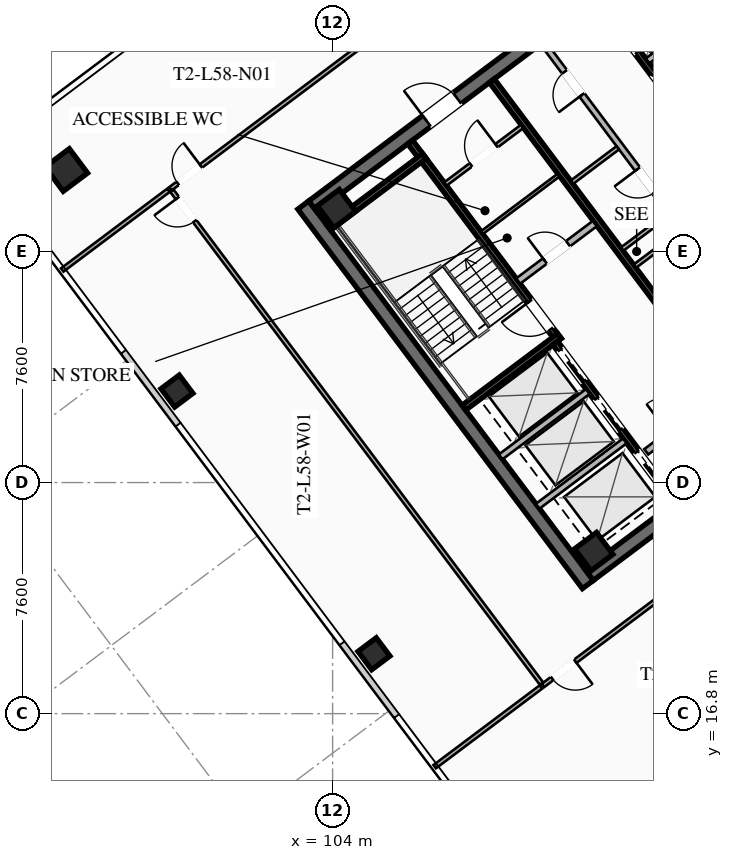
"""IFC4 building model, lengths in metres.
Left out: names, types, materials, properties, quantities, classifications, styles, units other than length and angle.
Written with IfcOpenShell. Run it as: python <this file> out.ifc"""

import sys

from ifc_helpers import new_model, si_unit, direction, frame, frame_2d, origin, origin_2d, place, context, subcontext, project, spatial, rectangle, hollow_rectangle, extrude, element, fill, save


model = new_model("IFC4")
c1 = context("Model", 3, precision=1e-05, world=origin(), true_north=direction((0.0, 1.0)))
c2 = subcontext(c1, "Body", "Model", "MODEL_VIEW")
j1 = project(units=[si_unit("LENGTHUNIT", "METRE"), si_unit("PLANEANGLEUNIT", "RADIAN")], contexts=[c1])
p1 = place(None, origin())
s1 = spatial("IfcSite", under=j1, at=p1, CompositionType="ELEMENT")
p2 = place(p1, origin())
s2 = spatial("IfcBuilding", under=s1, at=p2, CompositionType="ELEMENT")
p3 = place(p2, frame((0.0, 0.0, 214.85)))
s3 = spatial("IfcBuildingStorey", under=s2, at=p3, CompositionType="ELEMENT", Elevation=214.85)
p4 = place(p3, frame((112.396, 21.047, 0.0), z_axis=(0.0, 0.0, 1.0), x_axis=(-0.600005007985, 0.799996243986, 0.0)))
e1 = element("IfcWall", 1, at=p4, inside=s3, PredefinedType="SHEAR", context=c2, shape_type="SweptSolid", body=[
    extrude(rectangle(XDim=15.6, YDim=0.45, at=frame_2d((7.8, 0.0))), origin(), (0.0, 0.0, 1.0), 3.55),
])
p5 = place(p3, frame((124.649, 30.518, 0.0), z_axis=(0.0, 0.0, 1.0), x_axis=(-0.8, -0.6, 0.0)))
e2 = element("IfcWall", 2, at=p5, inside=s3, PredefinedType="SHEAR", context=c2, shape_type="SweptSolid", body=[
    extrude(rectangle(XDim=15.26, YDim=0.45, at=frame_2d((7.63, 0.0))), origin(), (0.0, 0.0, 1.0), 3.55),
])
p6 = place(p5, frame((9.33, 0.0, 0.0)))
e3 = element("IfcOpeningElement", 3, at=p6, cuts=e2, PredefinedType="OPENING", context=c2, shape_type="SweptSolid", body=[
    extrude(rectangle(XDim=1.25, YDim=2.25, at=frame_2d((0.625, 1.125))), frame((0.0, 0.235, 0.0), z_axis=(0.0, -1.0, 0.0), x_axis=(1.0, 0.0, 0.0)), (0.0, 0.0, 1.0), 0.47),
])
p7 = place(p5, frame((4.28, 0.0, 0.0)))
e4 = element("IfcOpeningElement", 4, at=p7, cuts=e2, PredefinedType="OPENING", context=c2, shape_type="SweptSolid", body=[
    extrude(rectangle(XDim=1.25, YDim=2.25, at=frame_2d((0.625, 1.125))), frame((0.0, 0.235, 0.0), z_axis=(0.0, -1.0, 0.0), x_axis=(1.0, 0.0, 0.0)), (0.0, 0.0, 1.0), 0.47),
])
p8 = place(p3, frame((103.351, 33.482, 0.0), z_axis=(0.0, 0.0, 1.0), x_axis=(0.8, 0.6, 0.0)))
e5 = element("IfcWall", 5, at=p8, inside=s3, PredefinedType="SHEAR", context=c2, shape_type="SweptSolid", body=[
    extrude(rectangle(XDim=15.26, YDim=0.45, at=frame_2d((7.63, 0.0))), origin(), (0.0, 0.0, 1.0), 3.55),
])
p9 = place(p8, frame((4.68, 0.0, 0.0)))
e6 = element("IfcOpeningElement", 6, at=p9, cuts=e5, PredefinedType="OPENING", context=c2, shape_type="SweptSolid", body=[
    extrude(rectangle(XDim=1.25, YDim=2.25, at=frame_2d((0.625, 1.125))), frame((0.0, 0.235, 0.0), z_axis=(0.0, -1.0, 0.0), x_axis=(1.0, 0.0, 0.0)), (0.0, 0.0, 1.0), 0.47),
])
p10 = place(p8, frame((9.73, 0.0, 0.0)))
e7 = element("IfcOpeningElement", 7, at=p10, cuts=e5, PredefinedType="OPENING", context=c2, shape_type="SweptSolid", body=[
    extrude(rectangle(XDim=1.25, YDim=2.25, at=frame_2d((0.625, 1.125))), frame((0.0, 0.235, 0.0), z_axis=(0.0, -1.0, 0.0), x_axis=(1.0, 0.0, 0.0)), (0.0, 0.0, 1.0), 0.47),
])
for number, where, z_axis, x_axis in (
    (8, (112.59, 22.13, 0.0), (0.0, 0.0, 1.0), (0.8, 0.6, 0.0)),
    (9, (104.13, 33.41, 0.0), (0.0, 0.0, 1.0), (0.8, 0.6, 0.0)),
):
    element("IfcColumn", number, at=place(p3, frame(where, z_axis=z_axis, x_axis=x_axis)), inside=s3, PredefinedType="COLUMN", context=c2, shape_type="SweptSolid", body=[
        extrude(hollow_rectangle(XDim=0.9, YDim=0.9, WallThickness=0.04, at=origin_2d()), origin(), (0.0, 0.0, 1.0), 3.37),
    ])
p11 = place(p3, frame((95.24, 34.68, 0.0), z_axis=(0.0, 0.0, 1.0), x_axis=(0.799999996291, 0.600000004945, 0.0)))
e10 = element("IfcColumn", 10, at=p11, inside=s3, PredefinedType="COLUMN", context=c2, shape_type="SweptSolid", body=[
    extrude(hollow_rectangle(XDim=1.0, YDim=1.0, WallThickness=0.04, at=origin_2d()), origin(), (0.0, 0.0, 1.0), 3.37),
])
for number, where, z_axis, x_axis in (
    (11, (98.88, 27.41, 0.0), (0.0, 0.0, 1.0), (0.8, 0.6, 0.0)),
    (12, (105.36, 18.77, 0.0), (0.0, 0.0, 1.0), (0.8, 0.6, 0.0)),
):
    element("IfcColumn", number, at=place(p3, frame(where, z_axis=z_axis, x_axis=x_axis)), inside=s3, PredefinedType="COLUMN", context=c2, shape_type="SweptSolid", body=[
        extrude(hollow_rectangle(XDim=0.75, YDim=0.75, WallThickness=0.032, at=origin_2d()), origin(), (0.0, 0.0, 1.0), 3.37),
    ])
p12 = place(p3, frame((111.44, 29.08, 0.0), z_axis=(0.0, 0.0, 1.0), x_axis=(-0.59999041401, 0.800007189403, 0.0)))
e13 = element("IfcWall", 13, at=p12, inside=s3, PredefinedType="SHEAR", context=c2, shape_type="SweptSolid", body=[
    extrude(rectangle(XDim=8.15, YDim=0.2, at=frame_2d((4.075, 0.0))), origin(), (0.0, 0.0, 1.0), 3.37),
])
p13 = place(p12, frame((0.45, 0.0, 0.0)))
e14 = element("IfcOpeningElement", 14, at=p13, cuts=e13, PredefinedType="OPENING", context=c2, shape_type="SweptSolid", body=[
    extrude(rectangle(XDim=1.15, YDim=2.2, at=frame_2d((0.575, 1.1))), frame((0.0, 0.11, 0.0), z_axis=(0.0, -1.0, 0.0), x_axis=(1.0, 0.0, 0.0)), (0.0, 0.0, 1.0), 0.22),
])
for number, where, z_axis, x_axis in (
    (15, (108.316, 26.862, 0.0), (0.0, 0.0, 1.0), (0.8, 0.6, 0.0)),
    (16, (103.876, 32.782, 0.0), (0.0, 0.0, 1.0), (0.8, 0.6, 0.0)),
):
    element("IfcWall", number, at=place(p3, frame(where, z_axis=z_axis, x_axis=x_axis)), inside=s3, PredefinedType="SHEAR", context=c2, shape_type="SweptSolid", body=[
        extrude(rectangle(XDim=3.93, YDim=0.2, at=frame_2d((1.965, 0.0))), origin(), (0.0, 0.0, 1.0), 3.37),
    ])
p14 = place(p3, frame((118.058, 25.856, 0.0), z_axis=(0.0, 0.0, 1.0), x_axis=(-0.600002657301, 0.799998007018, 0.0)))
e17 = element("IfcWall", 17, at=p14, inside=s3, PredefinedType="SHEAR", context=c2, shape_type="SweptSolid", body=[
    extrude(rectangle(XDim=14.7, YDim=0.2, at=frame_2d((7.35, 0.0))), origin(), (0.0, 0.0, 1.0), 3.37),
])
p15 = place(p3, frame((110.104, 31.028, 0.0), z_axis=(0.0, 0.0, 1.0), x_axis=(0.800018601094, 0.59997519774, 0.0)))
e18 = element("IfcWall", 18, at=p15, inside=s3, PredefinedType="SOLIDWALL", context=c2, shape_type="SweptSolid", body=[
    extrude(rectangle(XDim=3.15, YDim=0.22, at=frame_2d((1.575, 0.0))), origin(), (0.0, 0.0, 1.0), 2.723),
])
p16 = place(p15, frame((1.1, 0.0, 0.0)))
e19 = element("IfcOpeningElement", 19, at=p16, cuts=e18, PredefinedType="OPENING", context=c2, shape_type="SweptSolid", body=[
    extrude(rectangle(XDim=0.95, YDim=2.05, at=frame_2d((0.475, 1.025))), frame((0.0, 0.12, 0.0), z_axis=(0.0, -1.0, 0.0), x_axis=(1.0, 0.0, 0.0)), (0.0, 0.0, 1.0), 0.24),
])
p17 = place(p3, frame((114.316, 25.412, 0.0), z_axis=(0.0, 0.0, 1.0), x_axis=(0.800018601094, 0.59997519774, 0.0)))
e20 = element("IfcWall", 20, at=p17, inside=s3, PredefinedType="SOLIDWALL", context=c2, shape_type="SweptSolid", body=[
    extrude(rectangle(XDim=3.15, YDim=0.22, at=frame_2d((1.575, 0.0))), origin(), (0.0, 0.0, 1.0), 2.723),
])
p18 = place(p17, frame((0.95, 0.0, 0.0)))
e21 = element("IfcOpeningElement", 21, at=p18, cuts=e20, PredefinedType="OPENING", context=c2, shape_type="SweptSolid", body=[
    extrude(rectangle(XDim=1.25, YDim=2.25, at=frame_2d((0.625, 1.125))), frame((0.0, 0.12, 0.0), z_axis=(0.0, -1.0, 0.0), x_axis=(1.0, 0.0, 0.0)), (0.0, 0.0, 1.0), 0.24),
])
p19 = place(p3, frame((115.25, 23.75, 0.0), z_axis=(0.0, 0.0, 1.0), x_axis=(-0.599994036198, 0.800004472816, 0.0)))
e22 = element("IfcWall", 22, at=p19, inside=s3, PredefinedType="SHEAR", context=c2, shape_type="SweptSolid", body=[
    extrude(rectangle(XDim=6.55, YDim=0.2, at=frame_2d((3.275, 0.0))), origin(), (0.0, 0.0, 1.0), 3.37),
])
p20 = place(p19, frame((4.975, 0.0, 0.0)))
e23 = element("IfcOpeningElement", 23, at=p20, cuts=e22, PredefinedType="OPENING", context=c2, shape_type="SweptSolid", body=[
    extrude(rectangle(XDim=1.3, YDim=2.25, at=frame_2d((0.65, 1.125))), frame((0.0, 0.11, 0.0), z_axis=(0.0, -1.0, 0.0), x_axis=(1.0, 0.0, 0.0)), (0.0, 0.0, 1.0), 0.22),
])
p21 = place(p19, frame((2.975, 0.0, 0.0)))
e24 = element("IfcOpeningElement", 24, at=p21, cuts=e22, PredefinedType="OPENING", context=c2, shape_type="SweptSolid", body=[
    extrude(rectangle(XDim=1.3, YDim=2.25, at=frame_2d((0.65, 1.125))), frame((0.0, 0.11, 0.0), z_axis=(0.0, -1.0, 0.0), x_axis=(1.0, 0.0, 0.0)), (0.0, 0.0, 1.0), 0.22),
])
p22 = place(p19, frame((0.775, 0.0, 0.0)))
e25 = element("IfcOpeningElement", 25, at=p22, cuts=e22, PredefinedType="OPENING", context=c2, shape_type="SweptSolid", body=[
    extrude(rectangle(XDim=1.3, YDim=2.25, at=frame_2d((0.65, 1.125))), frame((0.0, 0.11, 0.0), z_axis=(0.0, -1.0, 0.0), x_axis=(1.0, 0.0, 0.0)), (0.0, 0.0, 1.0), 0.22),
])
for number, where, z_axis, x_axis in (
    (26, (110.746, 23.622, 0.0), (0.0, 0.0, 1.0), (0.8, 0.6, 0.0)),
    (27, (109.528, 25.246, 0.0), (0.0, 0.0, 1.0), (0.8, 0.6, 0.0)),
):
    element("IfcWall", number, at=place(p3, frame(where, z_axis=z_axis, x_axis=x_axis)), inside=s3, PredefinedType="SOLIDWALL", context=c2, shape_type="SweptSolid", body=[
        extrude(rectangle(XDim=3.58, YDim=0.2, at=frame_2d((1.79, 0.0))), origin(), (0.0, 0.0, 1.0), 3.37),
    ])
p23 = place(p3, frame((112.75, 40.25, 0.0), z_axis=(0.0, 0.0, 1.0), x_axis=(0.599994036198, -0.800004472816, 0.0)))
e28 = element("IfcWall", 28, at=p23, inside=s3, PredefinedType="SHEAR", context=c2, shape_type="SweptSolid", body=[
    extrude(rectangle(XDim=6.55, YDim=0.2, at=frame_2d((3.275, 0.0))), origin(), (0.0, 0.0, 1.0), 3.37),
])
p24 = place(p23, frame((5.075, 0.0, 0.0)))
e29 = element("IfcOpeningElement", 29, at=p24, cuts=e28, PredefinedType="OPENING", context=c2, shape_type="SweptSolid", body=[
    extrude(rectangle(XDim=1.1, YDim=2.2, at=frame_2d((0.55, 1.1))), frame((0.0, 0.11, 0.0), z_axis=(0.0, -1.0, 0.0), x_axis=(1.0, 0.0, 0.0)), (0.0, 0.0, 1.0), 0.22),
])
p25 = place(p23, frame((3.025, 0.0, 0.0)))
e30 = element("IfcOpeningElement", 30, at=p25, cuts=e28, PredefinedType="OPENING", context=c2, shape_type="SweptSolid", body=[
    extrude(rectangle(XDim=1.1, YDim=2.2, at=frame_2d((0.55, 1.1))), frame((0.0, 0.11, 0.0), z_axis=(0.0, -1.0, 0.0), x_axis=(1.0, 0.0, 0.0)), (0.0, 0.0, 1.0), 0.22),
])
p26 = place(p23, frame((1.025, 0.0, 0.0)))
e31 = element("IfcOpeningElement", 31, at=p26, cuts=e28, PredefinedType="OPENING", context=c2, shape_type="SweptSolid", body=[
    extrude(rectangle(XDim=1.1, YDim=2.2, at=frame_2d((0.55, 1.1))), frame((0.0, 0.11, 0.0), z_axis=(0.0, -1.0, 0.0), x_axis=(1.0, 0.0, 0.0)), (0.0, 0.0, 1.0), 0.22),
])
p27 = place(p3, frame((114.36, 38.27, 0.0), z_axis=(0.0, 0.0, 1.0), x_axis=(0.800008183455, 0.599989088572, 0.0)))
e32 = element("IfcWall", 32, at=p27, inside=s3, PredefinedType="SOLIDWALL", context=c2, shape_type="SweptSolid", body=[
    extrude(rectangle(XDim=3.58, YDim=0.2, at=frame_2d((1.79, 0.0))), origin(), (0.0, 0.0, 1.0), 3.37),
])
p28 = place(p3, frame((107.71, 34.22, 0.0), z_axis=(0.0, 0.0, 1.0), x_axis=(0.799981399002, 0.60002480053, 0.0)))
e33 = element("IfcWall", 33, at=p28, inside=s3, PredefinedType="PARTITIONING", context=c2, shape_type="SweptSolid", body=[
    extrude(rectangle(XDim=3.15, YDim=0.135, at=frame_2d((1.575, 0.0))), origin(), (0.0, 0.0, 1.0), 2.723),
])
p29 = place(p28, frame((1.05, 0.0, 0.0)))
e34 = element("IfcOpeningElement", 34, at=p29, cuts=e33, PredefinedType="OPENING", context=c2, shape_type="SweptSolid", body=[
    extrude(rectangle(XDim=1.05, YDim=2.2, at=frame_2d((0.525, 1.1))), frame((0.0, 0.077, 0.0), z_axis=(0.0, -1.0, 0.0), x_axis=(1.0, 0.0, 0.0)), (0.0, 0.0, 1.0), 0.155),
])
p30 = place(p3, frame((108.91, 32.62, 0.0), z_axis=(0.0, 0.0, 1.0), x_axis=(0.800018601094, 0.59997519774, 0.0)))
e35 = element("IfcWall", 35, at=p30, inside=s3, PredefinedType="PARTITIONING", context=c2, shape_type="SweptSolid", body=[
    extrude(rectangle(XDim=3.15, YDim=0.11, at=frame_2d((1.575, 0.0))), origin(), (0.0, 0.0, 1.0), 2.723),
])
p31 = place(p3, frame((113.946, 31.522, 0.0), z_axis=(0.0, 0.0, 1.0), x_axis=(0.8, 0.6, 0.0)))
e36 = element("IfcWall", 36, at=p31, inside=s3, PredefinedType="PARTITIONING", context=c2, shape_type="SweptSolid", body=[
    extrude(rectangle(XDim=1.88, YDim=0.135, at=frame_2d((0.94, 0.0))), origin(), (0.0, 0.0, 1.0), 2.723),
])
p32 = place(p3, frame((115.11, 33.27, 0.0), z_axis=(0.0, 0.0, 1.0), x_axis=(-0.600011160345, 0.79999162962, 0.0)))
e37 = element("IfcWall", 37, at=p32, inside=s3, PredefinedType="SOLIDWALL", context=c2, shape_type="SweptSolid", body=[
    extrude(rectangle(XDim=7.0, YDim=0.2, at=frame_2d((3.5, 0.0))), origin(), (0.0, 0.0, 1.0), 2.723),
])
p33 = place(p32, frame((0.85, 0.0, 0.0)))
e38 = element("IfcOpeningElement", 38, at=p33, cuts=e37, PredefinedType="OPENING", context=c2, shape_type="SweptSolid", body=[
    extrude(rectangle(XDim=0.95, YDim=2.05, at=frame_2d((0.475, 1.025))), frame((0.0, 0.11, 0.0), z_axis=(0.0, -1.0, 0.0), x_axis=(1.0, 0.0, 0.0)), (0.0, 0.0, 1.0), 0.22),
])
p34 = place(p32, frame((4.85, 0.0, 0.0)))
e39 = element("IfcOpeningElement", 39, at=p34, cuts=e37, PredefinedType="OPENING", context=c2, shape_type="SweptSolid", body=[
    extrude(rectangle(XDim=0.95, YDim=2.05, at=frame_2d((0.475, 1.025))), frame((0.0, 0.11, 0.0), z_axis=(0.0, -1.0, 0.0), x_axis=(1.0, 0.0, 0.0)), (0.0, 0.0, 1.0), 0.22),
])
p35 = place(p3, frame((113.526, 32.082, 0.0), z_axis=(0.0, 0.0, 1.0), x_axis=(0.800046745961, 0.599937666993, 0.0)))
e40 = element("IfcWall", 40, at=p35, inside=s3, PredefinedType="PARTITIONING", context=c2, shape_type="SweptSolid", body=[
    extrude(rectangle(XDim=1.88, YDim=0.135, at=frame_2d((0.94, 0.0))), origin(), (0.0, 0.0, 1.0), 2.723),
])
p36 = place(p3, frame((111.876, 34.282, 0.0), z_axis=(0.0, 0.0, 1.0), x_axis=(0.8, 0.6, 0.0)))
e41 = element("IfcWall", 41, at=p36, inside=s3, PredefinedType="PARTITIONING", context=c2, shape_type="SweptSolid", body=[
    extrude(rectangle(XDim=1.88, YDim=0.135, at=frame_2d((0.94, 0.0))), origin(), (0.0, 0.0, 1.0), 2.723),
])
p37 = place(p3, frame((98.666, 34.062, 0.0), z_axis=(0.0, 0.0, 1.0), x_axis=(0.800003619866, 0.599995173482, 0.0)))
e42 = element("IfcWall", 42, at=p37, inside=s3, PredefinedType="PARTITIONING", context=c2, shape_type="SweptSolid", body=[
    extrude(rectangle(XDim=24.28, YDim=0.135, at=frame_2d((12.14, 0.0))), origin(), (0.0, 0.0, 1.0), 2.723),
])
p38 = place(p37, frame((0.3, 0.0, 0.0)))
e43 = element("IfcOpeningElement", 43, at=p38, cuts=e42, PredefinedType="OPENING", context=c2, shape_type="SweptSolid", body=[
    extrude(rectangle(XDim=0.95, YDim=2.05, at=frame_2d((0.475, 1.025))), frame((0.0, 0.077, 0.0), z_axis=(0.0, -1.0, 0.0), x_axis=(1.0, 0.0, 0.0)), (0.0, 0.0, 1.0), 0.155),
])
p39 = place(p37, frame((10.854, 0.0, 0.0)))
e44 = element("IfcOpeningElement", 44, at=p39, cuts=e42, PredefinedType="OPENING", context=c2, shape_type="SweptSolid", body=[
    extrude(rectangle(XDim=0.95, YDim=2.05, at=frame_2d((0.475, 1.025))), frame((0.0, 0.077, 0.0), z_axis=(0.0, -1.0, 0.0), x_axis=(1.0, 0.0, 0.0)), (0.0, 0.0, 1.0), 0.155),
])
p40 = place(p37, frame((23.03, 0.0, 0.0)))
e45 = element("IfcOpeningElement", 45, at=p40, cuts=e42, PredefinedType="OPENING", context=c2, shape_type="SweptSolid", body=[
    extrude(rectangle(XDim=0.95, YDim=2.05, at=frame_2d((0.475, 1.025))), frame((0.0, 0.077, 0.0), z_axis=(0.0, -1.0, 0.0), x_axis=(1.0, 0.0, 0.0)), (0.0, 0.0, 1.0), 0.155),
])
p41 = place(p3, frame((123.262, 26.984, 0.0), z_axis=(0.0, 0.0, 1.0), x_axis=(-0.800005696094, -0.599992405132, 0.0)))
e46 = element("IfcWall", 46, at=p41, inside=s3, PredefinedType="PARTITIONING", context=c2, shape_type="SweptSolid", body=[
    extrude(rectangle(XDim=15.43, YDim=0.135, at=frame_2d((7.715, 0.0))), origin(), (0.0, 0.0, 1.0), 2.723),
])
p42 = place(p41, frame((14.1, 0.0, 0.0)))
e47 = element("IfcOpeningElement", 47, at=p42, cuts=e46, PredefinedType="OPENING", context=c2, shape_type="SweptSolid", body=[
    extrude(rectangle(XDim=0.95, YDim=2.05, at=frame_2d((0.475, 1.025))), frame((0.0, 0.077, 0.0), z_axis=(0.0, -1.0, 0.0), x_axis=(1.0, 0.0, 0.0)), (0.0, 0.0, 1.0), 0.155),
])
p43 = place(p41, frame((3.755, 0.0, 0.0)))
e48 = element("IfcOpeningElement", 48, at=p43, cuts=e46, PredefinedType="OPENING", context=c2, shape_type="SweptSolid", body=[
    extrude(rectangle(XDim=0.95, YDim=2.05, at=frame_2d((0.475, 1.025))), frame((0.0, 0.077, 0.0), z_axis=(0.0, -1.0, 0.0), x_axis=(1.0, 0.0, 0.0)), (0.0, 0.0, 1.0), 0.155),
])
p44 = place(p3, frame((110.87, 17.79, 0.0), z_axis=(0.0, 0.0, 1.0), x_axis=(-0.6, 0.8, 0.0)))
e49 = element("IfcWall", 49, at=p44, inside=s3, PredefinedType="PARTITIONING", context=c2, shape_type="SweptSolid", body=[
    extrude(rectangle(XDim=20.26, YDim=0.135, at=frame_2d((10.13, 0.0))), origin(), (0.0, 0.0, 1.0), 2.723),
])
p45 = place(p44, frame((19.01, 0.0, 0.0)))
e50 = element("IfcOpeningElement", 50, at=p45, cuts=e49, PredefinedType="OPENING", context=c2, shape_type="SweptSolid", body=[
    extrude(rectangle(XDim=0.95, YDim=2.05, at=frame_2d((0.475, 1.025))), frame((0.0, 0.077, 0.0), z_axis=(0.0, -1.0, 0.0), x_axis=(1.0, 0.0, 0.0)), (0.0, 0.0, 1.0), 0.155),
])
p46 = place(p3, frame((98.602, 34.014, 0.0), z_axis=(0.0, 0.0, 1.0), x_axis=(-0.800026815742, -0.599964244012, 0.0)))
e51 = element("IfcWall", 51, at=p46, inside=s3, PredefinedType="PARTITIONING", context=c2, shape_type="SweptSolid", body=[
    extrude(rectangle(XDim=4.37, YDim=0.135, at=frame_2d((2.185, 0.0))), origin(), (0.0, 0.0, 1.0), 2.723),
])
p47 = place(p3, frame((107.358, 15.056, 0.0), z_axis=(0.0, 0.0, 1.0), x_axis=(0.8, 0.6, 0.0)))
e52 = element("IfcWall", 52, at=p47, inside=s3, PredefinedType="PARTITIONING", context=c2, shape_type="SweptSolid", body=[
    extrude(rectangle(XDim=4.37, YDim=0.135, at=frame_2d((2.185, 0.0))), origin(), (0.0, 0.0, 1.0), 2.723),
])
p48 = place(p9, origin())
e53 = element("IfcDoor", 53, at=p48, inside=s3, OperationType="SINGLE_SWING_LEFT", PredefinedType="DOOR", context=c2, shape_type="SweptSolid", body=[
    extrude(rectangle(XDim=1.25, YDim=2.25, at=frame_2d((0.625, 1.125))), frame((0.0, 0.025, 0.0), z_axis=(0.0, -1.0, 0.0), x_axis=(1.0, 0.0, 0.0)), (0.0, 0.0, 1.0), 0.05),
])
fill(e6, e53)
p49 = place(p13, origin())
e54 = element("IfcDoor", 54, at=p49, inside=s3, OperationType="SINGLE_SWING_RIGHT", PredefinedType="DOOR", context=c2, shape_type="SweptSolid", body=[
    extrude(rectangle(XDim=1.15, YDim=2.2, at=frame_2d((0.575, 1.1))), frame((0.0, 0.025, 0.0), z_axis=(0.0, -1.0, 0.0), x_axis=(1.0, 0.0, 0.0)), (0.0, 0.0, 1.0), 0.05),
])
fill(e14, e54)
p50 = place(p29, origin())
e55 = element("IfcDoor", 55, at=p50, inside=s3, OperationType="SINGLE_SWING_RIGHT", PredefinedType="DOOR", context=c2, shape_type="SweptSolid", body=[
    extrude(rectangle(XDim=1.05, YDim=2.2, at=frame_2d((0.525, 1.1))), frame((0.0, 0.025, 0.0), z_axis=(0.0, -1.0, 0.0), x_axis=(1.0, 0.0, 0.0)), (0.0, 0.0, 1.0), 0.05),
])
fill(e34, e55)
p51 = place(p16, origin())
e56 = element("IfcDoor", 56, at=p51, inside=s3, OperationType="SINGLE_SWING_LEFT", PredefinedType="DOOR", context=c2, shape_type="SweptSolid", body=[
    extrude(rectangle(XDim=0.95, YDim=2.05, at=frame_2d((0.475, 1.025))), frame((0.0, 0.025, 0.0), z_axis=(0.0, -1.0, 0.0), x_axis=(1.0, 0.0, 0.0)), (0.0, 0.0, 1.0), 0.05),
])
fill(e19, e56)
p52 = place(p33, origin())
e57 = element("IfcDoor", 57, at=p52, inside=s3, OperationType="SINGLE_SWING_RIGHT", PredefinedType="DOOR", context=c2, shape_type="SweptSolid", body=[
    extrude(rectangle(XDim=0.95, YDim=2.05, at=frame_2d((0.475, 1.025))), frame((0.0, 0.025, 0.0), z_axis=(0.0, -1.0, 0.0), x_axis=(1.0, 0.0, 0.0)), (0.0, 0.0, 1.0), 0.05),
])
fill(e38, e57)
p53 = place(p34, origin())
e58 = element("IfcDoor", 58, at=p53, inside=s3, OperationType="SINGLE_SWING_LEFT", PredefinedType="DOOR", context=c2, shape_type="SweptSolid", body=[
    extrude(rectangle(XDim=0.95, YDim=2.05, at=frame_2d((0.475, 1.025))), frame((0.0, 0.025, 0.0), z_axis=(0.0, -1.0, 0.0), x_axis=(1.0, 0.0, 0.0)), (0.0, 0.0, 1.0), 0.05),
])
fill(e39, e58)
p54 = place(p38, origin())
e59 = element("IfcDoor", 59, at=p54, inside=s3, OperationType="SINGLE_SWING_RIGHT", PredefinedType="DOOR", context=c2, shape_type="SweptSolid", body=[
    extrude(rectangle(XDim=0.95, YDim=2.05, at=frame_2d((0.475, 1.025))), frame((0.0, 0.025, 0.0), z_axis=(0.0, -1.0, 0.0), x_axis=(1.0, 0.0, 0.0)), (0.0, 0.0, 1.0), 0.05),
])
fill(e43, e59)
p55 = place(p42, origin())
e60 = element("IfcDoor", 60, at=p55, inside=s3, OperationType="SINGLE_SWING_LEFT", PredefinedType="DOOR", context=c2, shape_type="SweptSolid", body=[
    extrude(rectangle(XDim=0.95, YDim=2.05, at=frame_2d((0.475, 1.025))), frame((0.0, 0.025, 0.0), z_axis=(0.0, -1.0, 0.0), x_axis=(1.0, 0.0, 0.0)), (0.0, 0.0, 1.0), 0.05),
])
fill(e47, e60)
p56 = place(p45, origin())
e61 = element("IfcDoor", 61, at=p56, inside=s3, OperationType="SINGLE_SWING_RIGHT", PredefinedType="DOOR", context=c2, shape_type="SweptSolid", body=[
    extrude(rectangle(XDim=0.95, YDim=2.05, at=frame_2d((0.475, 1.025))), frame((0.0, 0.025, 0.0), z_axis=(0.0, -1.0, 0.0), x_axis=(1.0, 0.0, 0.0)), (0.0, 0.0, 1.0), 0.05),
])
fill(e50, e61)
p57 = place(p20, origin())
e62 = element("IfcDoor", 62, at=p57, inside=s3, OperationType="SLIDING_TO_LEFT", PredefinedType="DOOR", context=c2, shape_type="SweptSolid", body=[
    extrude(rectangle(XDim=1.3, YDim=2.25, at=frame_2d((0.65, 1.125))), frame((0.0, 0.025, 0.0), z_axis=(0.0, -1.0, 0.0), x_axis=(1.0, 0.0, 0.0)), (0.0, 0.0, 1.0), 0.05),
])
fill(e23, e62)
p58 = place(p21, origin())
e63 = element("IfcDoor", 63, at=p58, inside=s3, OperationType="SLIDING_TO_LEFT", PredefinedType="DOOR", context=c2, shape_type="SweptSolid", body=[
    extrude(rectangle(XDim=1.3, YDim=2.25, at=frame_2d((0.65, 1.125))), frame((0.0, 0.025, 0.0), z_axis=(0.0, -1.0, 0.0), x_axis=(1.0, 0.0, 0.0)), (0.0, 0.0, 1.0), 0.05),
])
fill(e24, e63)
p59 = place(p22, origin())
e64 = element("IfcDoor", 64, at=p59, inside=s3, OperationType="SLIDING_TO_LEFT", PredefinedType="DOOR", context=c2, shape_type="SweptSolid", body=[
    extrude(rectangle(XDim=1.3, YDim=2.25, at=frame_2d((0.65, 1.125))), frame((0.0, 0.025, 0.0), z_axis=(0.0, -1.0, 0.0), x_axis=(1.0, 0.0, 0.0)), (0.0, 0.0, 1.0), 0.05),
])
fill(e25, e64)
p60 = place(p25, origin())
e65 = element("IfcDoor", 65, at=p60, inside=s3, OperationType="SLIDING_TO_LEFT", PredefinedType="DOOR", context=c2, shape_type="SweptSolid", body=[
    extrude(rectangle(XDim=1.1, YDim=2.2, at=frame_2d((0.55, 1.1))), frame((0.0, 0.025, 0.0), z_axis=(0.0, -1.0, 0.0), x_axis=(1.0, 0.0, 0.0)), (0.0, 0.0, 1.0), 0.05),
])
fill(e30, e65)
p61 = place(p26, origin())
e66 = element("IfcDoor", 66, at=p61, inside=s3, OperationType="SLIDING_TO_LEFT", PredefinedType="DOOR", context=c2, shape_type="SweptSolid", body=[
    extrude(rectangle(XDim=1.1, YDim=2.2, at=frame_2d((0.55, 1.1))), frame((0.0, 0.025, 0.0), z_axis=(0.0, -1.0, 0.0), x_axis=(1.0, 0.0, 0.0)), (0.0, 0.0, 1.0), 0.05),
])
fill(e31, e66)
save(model, sys.argv[1])
